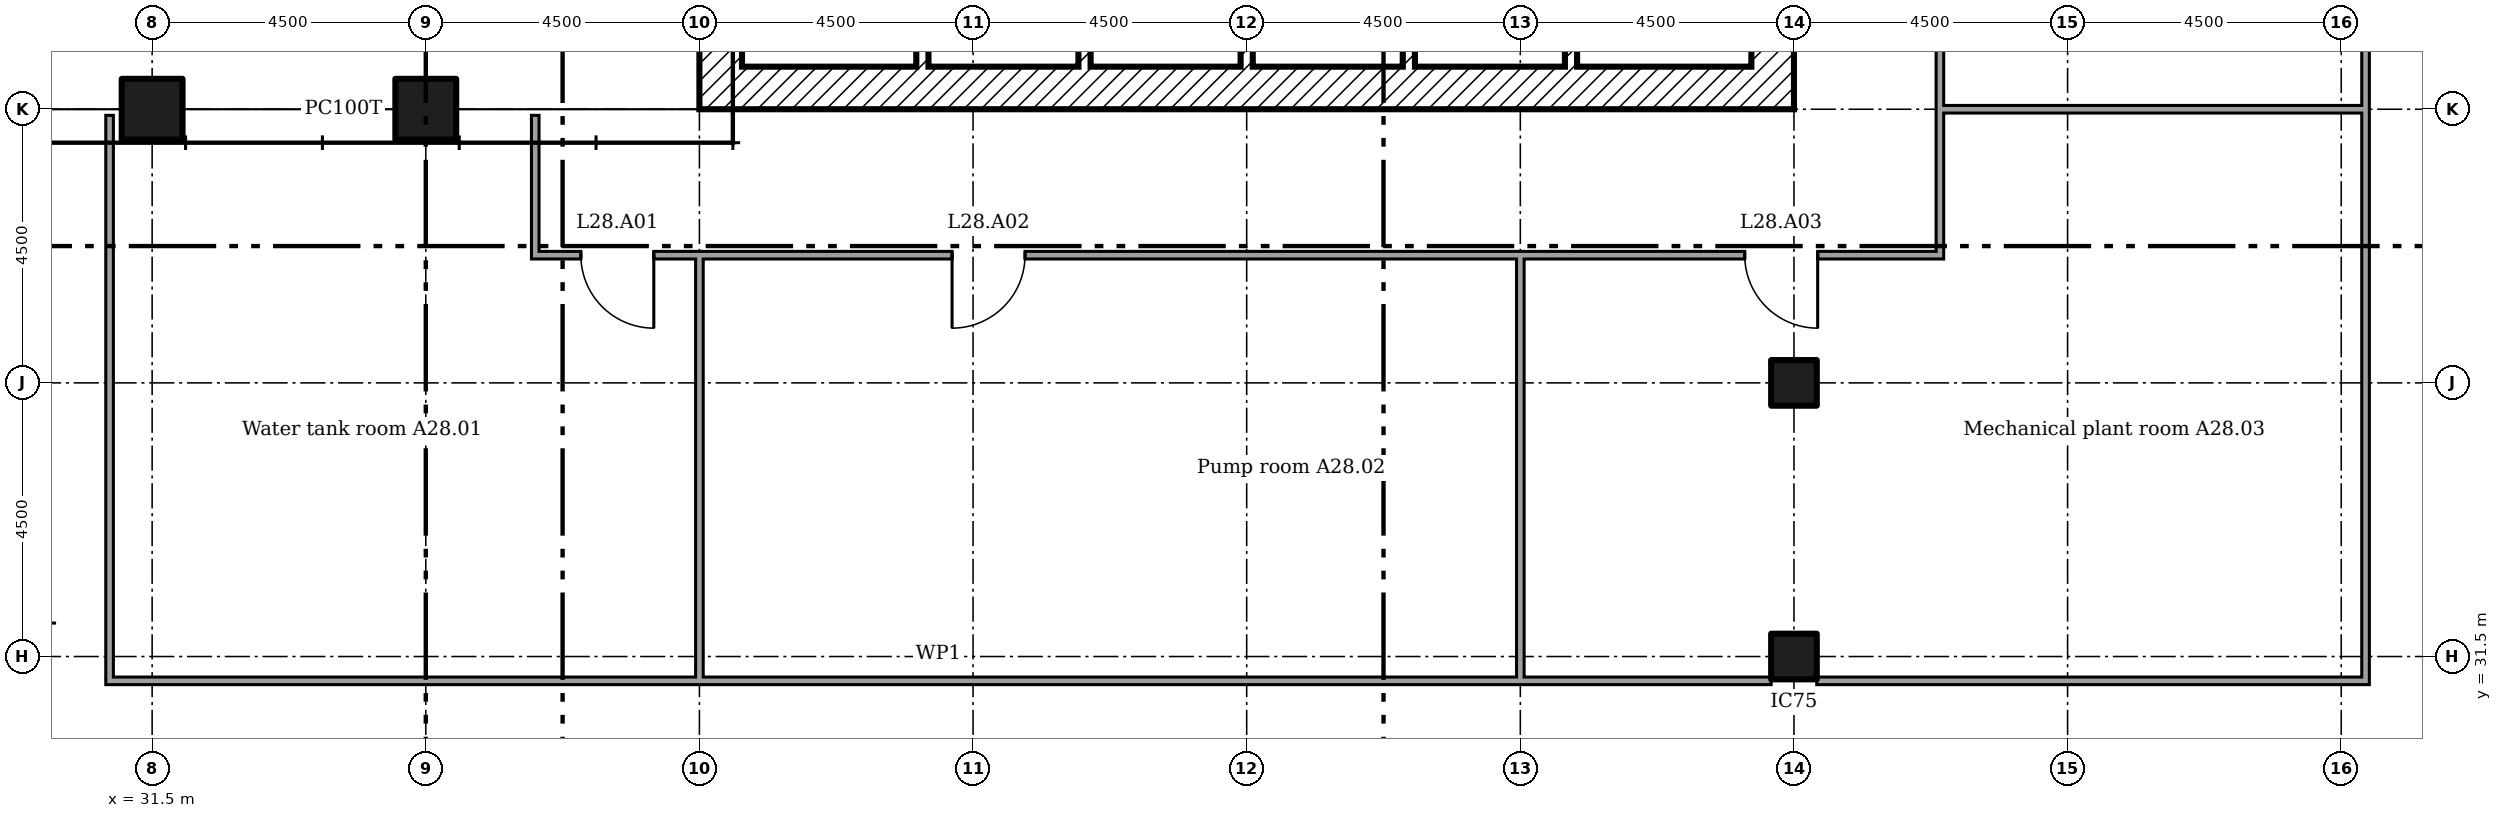
"""IFC4 building model, lengths in metres.
Left out: names, types, materials, properties, quantities, classifications, styles, units other than length and angle.
Written with IfcOpenShell. Run it as: python <this file> out.ifc"""

import sys

from ifc_helpers import new_model, si_unit, direction, frame, frame_2d, origin, origin_2d, place, context, subcontext, project, spatial, rectangle, extrude, element, fill, save


model = new_model("IFC4")
c1 = context("Model", 3, precision=1e-05, world=origin(), true_north=direction((0.0, 1.0)))
c2 = subcontext(c1, "Body", "Model", "MODEL_VIEW")
j1 = project(units=[si_unit("LENGTHUNIT", "METRE"), si_unit("PLANEANGLEUNIT", "RADIAN")], contexts=[c1])
p1 = place(None, origin())
s1 = spatial("IfcSite", under=j1, at=p1, CompositionType="ELEMENT")
p2 = place(p1, origin())
s2 = spatial("IfcBuilding", under=s1, at=p2, CompositionType="ELEMENT")
p3 = place(p2, frame((0.0, 0.0, 113.6)))
s3 = spatial("IfcBuildingStorey", under=s2, at=p3, CompositionType="ELEMENT", Elevation=113.6)
for number, where in (
    (1, (36.0, 40.5, 0.0)),
    (2, (31.5, 40.5, 0.0)),
):
    element("IfcColumn", number, at=place(p3, frame(where)), inside=s3, PredefinedType="COLUMN", context=c2, shape_type="SweptSolid", body=[
        extrude(rectangle(XDim=1.0, YDim=1.0, at=origin_2d()), origin(), (0.0, 0.0, 1.0), 7.2),
    ])
for number, where in (
    (3, (58.5, 31.5, 0.0)),
    (4, (58.5, 36.0, 0.0)),
):
    element("IfcColumn", number, at=place(p3, frame(where)), inside=s3, PredefinedType="COLUMN", context=c2, shape_type="SweptSolid", body=[
        extrude(rectangle(XDim=0.75, YDim=0.75, at=origin_2d()), origin(), (0.0, 0.0, 1.0), 7.2),
    ])
p4 = place(p3, frame((58.15, 40.5, 0.0), z_axis=(0.0, 0.0, 1.0), x_axis=(0.0, 1.0, 0.0)))
e5 = element("IfcWall", 5, at=p4, inside=s3, PredefinedType="SHEAR", context=c2, shape_type="SweptSolid", body=[
    extrude(rectangle(XDim=18.0, YDim=0.7, at=frame_2d((9.0, 0.0))), origin(), (0.0, 0.0, 1.0), 6.95),
])
p5 = place(p4, frame((13.15, 0.0, 0.0)))
e6 = element("IfcOpeningElement", 6, at=p5, cuts=e5, PredefinedType="OPENING", context=c2, shape_type="SweptSolid", body=[
    extrude(rectangle(XDim=1.2, YDim=2.1, at=frame_2d((0.6, 1.05))), frame((0.0, 0.36, 0.0), z_axis=(0.0, -1.0, 0.0), x_axis=(1.0, 0.0, 0.0)), (0.0, 0.0, 1.0), 0.72),
])
p6 = place(p4, frame((3.9, 0.0, 0.0)))
e7 = element("IfcOpeningElement", 7, at=p6, cuts=e5, PredefinedType="OPENING", context=c2, shape_type="SweptSolid", body=[
    extrude(rectangle(XDim=1.8, YDim=2.1, at=frame_2d((0.9, 1.05))), frame((0.0, 0.36, 0.0), z_axis=(0.0, -1.0, 0.0), x_axis=(1.0, 0.0, 0.0)), (0.0, 0.0, 1.0), 0.72),
])
p7 = place(p4, frame((11.525, 0.0, 0.0)))
e8 = element("IfcOpeningElement", 8, at=p7, cuts=e5, PredefinedType="OPENING", context=c2, shape_type="SweptSolid", body=[
    extrude(rectangle(XDim=1.0, YDim=2.1, at=frame_2d((0.5, 1.05))), frame((0.0, 0.36, 0.0), z_axis=(0.0, -1.0, 0.0), x_axis=(1.0, 0.0, 0.0)), (0.0, 0.0, 1.0), 0.72),
])
p8 = place(p3, frame((41.2, 40.85, 0.0)))
e9 = element("IfcWall", 9, at=p8, inside=s3, PredefinedType="SHEAR", context=c2, shape_type="SweptSolid", body=[
    extrude(rectangle(XDim=16.6, YDim=0.7, at=frame_2d((8.3, 0.0))), origin(), (0.0, 0.0, 1.0), 6.95),
])
p9 = place(p3, frame((40.85, 40.5, 0.0), z_axis=(0.0, 0.0, 1.0), x_axis=(0.0, 1.0, 0.0)))
e10 = element("IfcWall", 10, at=p9, inside=s3, PredefinedType="SHEAR", context=c2, shape_type="SweptSolid", body=[
    extrude(rectangle(XDim=18.0, YDim=0.7, at=frame_2d((9.0, 0.0))), origin(), (0.0, 0.0, 1.0), 6.95),
])
for number, where, z_axis, x_axis in (
    (11, (44.167, 41.2, 0.0), (0.0, 0.0, 1.0), (0.0, 1.0, 0.0)),
    (12, (46.833, 41.2, 0.0), (0.0, 0.0, 1.0), (0.0, 1.0, 0.0)),
    (13, (49.5, 41.2, 0.0), (0.0, 0.0, 1.0), (0.0, 1.0, 0.0)),
    (14, (52.167, 41.2, 0.0), (0.0, 0.0, 1.0), (0.0, 1.0, 0.0)),
    (15, (54.833, 41.2, 0.0), (0.0, 0.0, 1.0), (0.0, 1.0, 0.0)),
):
    element("IfcWall", number, at=place(p3, frame(where, z_axis=z_axis, x_axis=x_axis)), inside=s3, PredefinedType="SHEAR", context=c2, shape_type="SweptSolid", body=[
        extrude(rectangle(XDim=2.6, YDim=0.2, at=frame_2d((1.3, 0.0))), origin(), (0.0, 0.0, 1.0), 6.95),
    ])
p10 = place(p3, frame((30.738, 31.1, 0.0)))
e16 = element("IfcWall", 16, at=p10, inside=s3, PredefinedType="PARTITIONING", context=c2, shape_type="SweptSolid", body=[
    extrude(rectangle(XDim=27.387, YDim=0.125, at=frame_2d((13.694, 0.0))), origin(), (0.0, 0.0, 1.0), 7.05),
])
p11 = place(p3, frame((58.875, 31.1, 0.0)))
e17 = element("IfcWall", 17, at=p11, inside=s3, PredefinedType="PARTITIONING", context=c2, shape_type="SweptSolid", body=[
    extrude(rectangle(XDim=9.087, YDim=0.125, at=frame_2d((4.544, 0.0))), origin(), (0.0, 0.0, 1.0), 7.05),
])
p12 = place(p3, frame((37.738, 38.1, 0.0)))
e18 = element("IfcWall", 18, at=p12, inside=s3, PredefinedType="PARTITIONING", context=c2, shape_type="SweptSolid", body=[
    extrude(rectangle(XDim=23.225, YDim=0.125, at=frame_2d((11.612, 0.0))), origin(), (0.0, 0.0, 1.0), 7.05),
])
p13 = place(p12, frame((0.812, 0.0, 0.0)))
e19 = element("IfcOpeningElement", 19, at=p13, cuts=e18, PredefinedType="OPENING", context=c2, shape_type="SweptSolid", body=[
    extrude(rectangle(XDim=1.2, YDim=2.1, at=frame_2d((0.6, 1.05))), frame((0.0, 0.073, 0.0), z_axis=(0.0, -1.0, 0.0), x_axis=(1.0, 0.0, 0.0)), (0.0, 0.0, 1.0), 0.145),
])
p14 = place(p12, frame((6.917, 0.0, 0.0)))
e20 = element("IfcOpeningElement", 20, at=p14, cuts=e18, PredefinedType="OPENING", context=c2, shape_type="SweptSolid", body=[
    extrude(rectangle(XDim=1.2, YDim=2.1, at=frame_2d((0.6, 1.05))), frame((0.0, 0.073, 0.0), z_axis=(0.0, -1.0, 0.0), x_axis=(1.0, 0.0, 0.0)), (0.0, 0.0, 1.0), 0.145),
])
p15 = place(p12, frame((19.952, 0.0, 0.0)))
e21 = element("IfcOpeningElement", 21, at=p15, cuts=e18, PredefinedType="OPENING", context=c2, shape_type="SweptSolid", body=[
    extrude(rectangle(XDim=1.2, YDim=2.1, at=frame_2d((0.6, 1.05))), frame((0.0, 0.073, 0.0), z_axis=(0.0, -1.0, 0.0), x_axis=(1.0, 0.0, 0.0)), (0.0, 0.0, 1.0), 0.145),
])
p16 = place(p3, frame((60.9, 40.5, 0.0)))
e22 = element("IfcWall", 22, at=p16, inside=s3, PredefinedType="PARTITIONING", context=c2, shape_type="SweptSolid", body=[
    extrude(rectangle(XDim=7.0, YDim=0.125, at=frame_2d((3.5, 0.0))), origin(), (0.0, 0.0, 1.0), 6.366),
])
p17 = place(p3, frame((30.8, 31.163, 0.0), z_axis=(0.0, 0.0, 1.0), x_axis=(0.0, 1.0, 0.0)))
e23 = element("IfcWall", 23, at=p17, inside=s3, PredefinedType="PARTITIONING", context=c2, shape_type="SweptSolid", body=[
    extrude(rectangle(XDim=9.237, YDim=0.125, at=frame_2d((4.619, 0.0))), origin(), (0.0, 0.0, 1.0), 7.05),
])
p18 = place(p3, frame((37.8, 38.163, 0.0), z_axis=(0.0, 0.0, 1.0), x_axis=(0.0, 1.0, 0.0)))
e24 = element("IfcWall", 24, at=p18, inside=s3, PredefinedType="PARTITIONING", context=c2, shape_type="SweptSolid", body=[
    extrude(rectangle(XDim=2.237, YDim=0.125, at=frame_2d((1.119, 0.0))), origin(), (0.0, 0.0, 1.0), 7.05),
])
for number, where, z_axis, x_axis in (
    (25, (40.5, 31.1, 0.0), (0.0, 0.0, 1.0), (0.0, 1.0, 0.0)),
    (26, (54.0, 31.1, 0.0), (0.0, 0.0, 1.0), (0.0, 1.0, 0.0)),
):
    element("IfcWall", number, at=place(p3, frame(where, z_axis=z_axis, x_axis=x_axis)), inside=s3, PredefinedType="PARTITIONING", context=c2, shape_type="SweptSolid", body=[
        extrude(rectangle(XDim=7.0, YDim=0.125, at=frame_2d((3.5, 0.0))), origin(), (0.0, 0.0, 1.0), 6.366),
    ])
p19 = place(p3, frame((60.9, 38.163, 0.0), z_axis=(0.0, 0.0, 1.0), x_axis=(0.0, 1.0, 0.0)))
e27 = element("IfcWall", 27, at=p19, inside=s3, PredefinedType="PARTITIONING", context=c2, shape_type="SweptSolid", body=[
    extrude(rectangle(XDim=22.675, YDim=0.125, at=frame_2d((11.337, 0.0))), origin(), (0.0, 0.0, 1.0), 7.05),
])
p20 = place(p19, frame((6.238, 0.0, 0.0)))
e28 = element("IfcOpeningElement", 28, at=p20, cuts=e27, PredefinedType="OPENING", context=c2, shape_type="SweptSolid", body=[
    extrude(rectangle(XDim=1.2, YDim=2.1, at=frame_2d((0.6, 1.05))), frame((0.0, 0.073, 0.0), z_axis=(0.0, -1.0, 0.0), x_axis=(1.0, 0.0, 0.0)), (0.0, 0.0, 1.0), 0.145),
])
p21 = place(p19, frame((12.567, 0.0, 0.0)))
e29 = element("IfcOpeningElement", 29, at=p21, cuts=e27, PredefinedType="OPENING", context=c2, shape_type="SweptSolid", body=[
    extrude(rectangle(XDim=1.2, YDim=2.1, at=frame_2d((0.6, 1.05))), frame((0.0, 0.073, 0.0), z_axis=(0.0, -1.0, 0.0), x_axis=(1.0, 0.0, 0.0)), (0.0, 0.0, 1.0), 0.145),
])
p22 = place(p19, frame((19.528, 0.0, 0.0)))
e30 = element("IfcOpeningElement", 30, at=p22, cuts=e27, PredefinedType="OPENING", context=c2, shape_type="SweptSolid", body=[
    extrude(rectangle(XDim=1.2, YDim=2.1, at=frame_2d((0.6, 1.05))), frame((0.0, 0.073, 0.0), z_axis=(0.0, -1.0, 0.0), x_axis=(1.0, 0.0, 0.0)), (0.0, 0.0, 1.0), 0.145),
])
p23 = place(p3, frame((67.9, 31.163, 0.0), z_axis=(0.0, 0.0, 1.0), x_axis=(0.0, 1.0, 0.0)))
e31 = element("IfcWall", 31, at=p23, inside=s3, PredefinedType="PARTITIONING", context=c2, shape_type="SweptSolid", body=[
    extrude(rectangle(XDim=26.962, YDim=0.125, at=frame_2d((13.481, 0.0))), origin(), (0.0, 0.0, 1.0), 7.05),
])
p24 = place(p13, frame((1.2, 0.0, 0.0), x_axis=(-1.0, 0.0, 0.0)))
e32 = element("IfcDoor", 32, at=p24, inside=s3, OperationType="SINGLE_SWING_RIGHT", PredefinedType="DOOR", context=c2, shape_type="SweptSolid", body=[
    extrude(rectangle(XDim=1.2, YDim=2.1, at=frame_2d((0.6, 1.05))), frame((0.0, 0.025, 0.0), z_axis=(0.0, -1.0, 0.0), x_axis=(1.0, 0.0, 0.0)), (0.0, 0.0, 1.0), 0.05),
])
fill(e19, e32)
p25 = place(p14, frame((1.2, 0.0, 0.0), x_axis=(-1.0, 0.0, 0.0)))
e33 = element("IfcDoor", 33, at=p25, inside=s3, OperationType="SINGLE_SWING_LEFT", PredefinedType="DOOR", context=c2, shape_type="SweptSolid", body=[
    extrude(rectangle(XDim=1.2, YDim=2.1, at=frame_2d((0.6, 1.05))), frame((0.0, 0.025, 0.0), z_axis=(0.0, -1.0, 0.0), x_axis=(1.0, 0.0, 0.0)), (0.0, 0.0, 1.0), 0.05),
])
fill(e20, e33)
p26 = place(p15, frame((1.2, 0.0, 0.0), x_axis=(-1.0, 0.0, 0.0)))
e34 = element("IfcDoor", 34, at=p26, inside=s3, OperationType="SINGLE_SWING_RIGHT", PredefinedType="DOOR", context=c2, shape_type="SweptSolid", body=[
    extrude(rectangle(XDim=1.2, YDim=2.1, at=frame_2d((0.6, 1.05))), frame((0.0, 0.025, 0.0), z_axis=(0.0, -1.0, 0.0), x_axis=(1.0, 0.0, 0.0)), (0.0, 0.0, 1.0), 0.05),
])
fill(e21, e34)
save(model, sys.argv[1])
